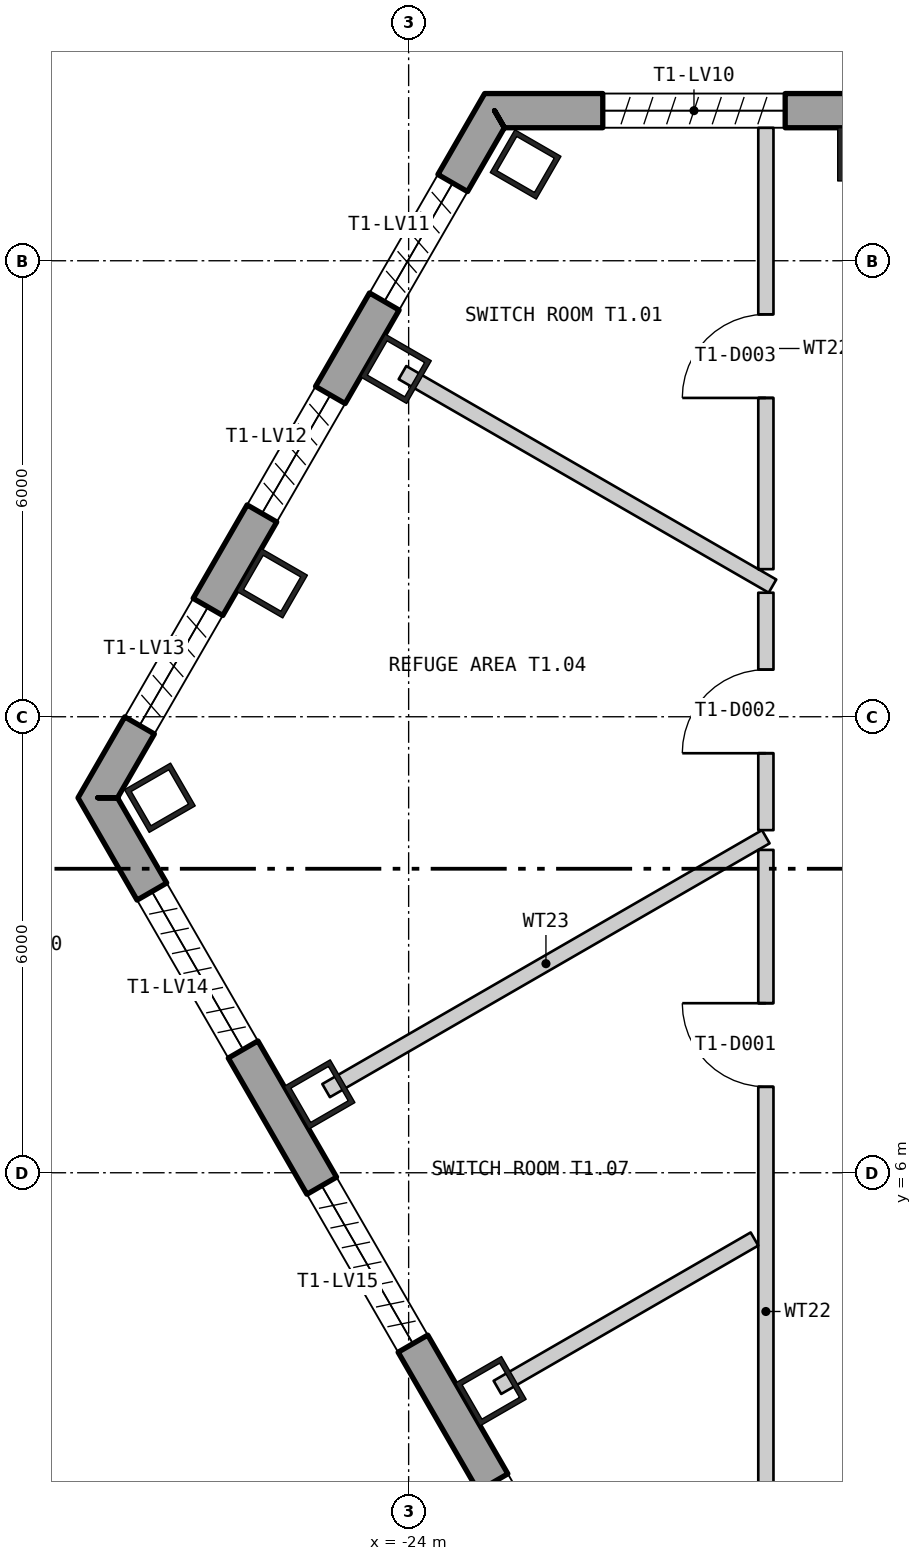
"""IFC4 building model, lengths in metres.
Left out: names, types, materials, properties, quantities, classifications, styles, units other than length and angle.
Written with IfcOpenShell. Run it as: python <this file> out.ifc"""

import sys

from ifc_helpers import new_model, si_unit, direction, frame, frame_2d, origin, origin_2d, place, context, subcontext, project, spatial, polyline, rectangle, hollow_rectangle, outline, extrude, element, fill, save


model = new_model("IFC4")
c1 = context("Model", 3, precision=1e-05, world=origin(), true_north=direction((0.0, 1.0)))
c2 = subcontext(c1, "Body", "Model", "MODEL_VIEW")
j1 = project(units=[si_unit("LENGTHUNIT", "METRE"), si_unit("PLANEANGLEUNIT", "RADIAN")], contexts=[c1])
p1 = place(None, origin())
s1 = spatial("IfcSite", under=j1, at=p1, CompositionType="ELEMENT")
p2 = place(p1, origin())
s2 = spatial("IfcBuilding", under=s1, at=p2, CompositionType="ELEMENT")
p3 = place(p2, frame((0.0, 0.0, 78.3)))
s3 = spatial("IfcBuildingStorey", under=s2, at=p3, CompositionType="ELEMENT", Elevation=78.3)
for number, where, z_axis, x_axis in (
    (1, (-18.03, 19.4, 0.0), (0.0, 0.0, 1.0), (-1.0, 0.0, 0.0)),
    (2, (-22.461, 19.267, 0.0), (0.0, 0.0, 1.0), (-0.5, -0.866, 0.0)),
    (3, (-24.167, 16.578, 0.0), (0.0, 0.0, 1.0), (-0.5, -0.866, 0.0)),
    (4, (-25.797, 13.756, 0.0), (0.0, 0.0, 1.0), (-0.5, -0.866, 0.0)),
    (5, (-27.273, 10.934, 0.0), (0.0, 0.0, 1.0), (0.5, -0.866, 0.0)),
    (6, (-25.172, 7.03, 0.0), (0.0, 0.0, 1.0), (0.5, -0.866, 0.0)),
    (7, (-22.919, 3.126, 0.0), (0.0, 0.0, 1.0), (0.5, -0.866, 0.0)),
):
    element("IfcColumn", number, at=place(p3, frame(where, z_axis=z_axis, x_axis=x_axis)), inside=s3, PredefinedType="COLUMN", context=c2, shape_type="SweptSolid", body=[
        extrude(hollow_rectangle(XDim=0.65, YDim=0.7, WallThickness=0.065, at=origin_2d()), origin(), (0.0, 0.0, 1.0), 6.0),
    ])
p4 = place(p3, frame((22.87, 19.975, -0.4), z_axis=(0.0, 0.0, 1.0), x_axis=(-1.0, 0.0, 0.0)))
e8 = element("IfcWall", 8, at=p4, inside=s3, PredefinedType="SOLIDWALL", context=c2, shape_type="SweptSolid", body=[
    extrude(outline(polyline([(-0.13, -0.225), (45.87, -0.225), (45.61, 0.225), (0.13, 0.225), (-0.13, -0.225)])), origin(), (0.0, 0.0, 1.0), 6.0),
])
p5 = place(p4, frame((1.424, 0.0, 1.6)))
e9 = element("IfcOpeningElement", 9, at=p5, cuts=e8, PredefinedType="OPENING", context=c2, shape_type="SweptSolid", body=[
    extrude(rectangle(XDim=2.4, YDim=3.6, at=frame_2d((1.2, 1.8))), frame((0.0, 0.235, 0.0), z_axis=(0.0, -1.0, 0.0), x_axis=(1.0, 0.0, 0.0)), (0.0, 0.0, 1.0), 0.47),
])
p6 = place(p4, frame((5.893, 0.0, 1.6)))
e10 = element("IfcOpeningElement", 10, at=p6, cuts=e8, PredefinedType="OPENING", context=c2, shape_type="SweptSolid", body=[
    extrude(rectangle(XDim=2.4, YDim=3.6, at=frame_2d((1.2, 1.8))), frame((0.0, 0.235, 0.0), z_axis=(0.0, -1.0, 0.0), x_axis=(1.0, 0.0, 0.0)), (0.0, 0.0, 1.0), 0.47),
])
p7 = place(p4, frame((10.401, 0.0, 1.6)))
e11 = element("IfcOpeningElement", 11, at=p7, cuts=e8, PredefinedType="OPENING", context=c2, shape_type="SweptSolid", body=[
    extrude(rectangle(XDim=2.4, YDim=3.6, at=frame_2d((1.2, 1.8))), frame((0.0, 0.235, 0.0), z_axis=(0.0, -1.0, 0.0), x_axis=(1.0, 0.0, 0.0)), (0.0, 0.0, 1.0), 0.47),
])
p8 = place(p4, frame((14.909, 0.0, 1.6)))
e12 = element("IfcOpeningElement", 12, at=p8, cuts=e8, PredefinedType="OPENING", context=c2, shape_type="SweptSolid", body=[
    extrude(rectangle(XDim=2.4, YDim=3.6, at=frame_2d((1.2, 1.8))), frame((0.0, 0.235, 0.0), z_axis=(0.0, -1.0, 0.0), x_axis=(1.0, 0.0, 0.0)), (0.0, 0.0, 1.0), 0.47),
])
p9 = place(p4, frame((19.416, 0.0, 1.6)))
e13 = element("IfcOpeningElement", 13, at=p9, cuts=e8, PredefinedType="OPENING", context=c2, shape_type="SweptSolid", body=[
    extrude(rectangle(XDim=2.4, YDim=3.6, at=frame_2d((1.2, 1.8))), frame((0.0, 0.235, 0.0), z_axis=(0.0, -1.0, 0.0), x_axis=(1.0, 0.0, 0.0)), (0.0, 0.0, 1.0), 0.47),
])
p10 = place(p4, frame((23.924, 0.0, 1.6)))
e14 = element("IfcOpeningElement", 14, at=p10, cuts=e8, PredefinedType="OPENING", context=c2, shape_type="SweptSolid", body=[
    extrude(rectangle(XDim=2.4, YDim=3.6, at=frame_2d((1.2, 1.8))), frame((0.0, 0.235, 0.0), z_axis=(0.0, -1.0, 0.0), x_axis=(1.0, 0.0, 0.0)), (0.0, 0.0, 1.0), 0.47),
])
p11 = place(p4, frame((28.431, 0.0, 1.6)))
e15 = element("IfcOpeningElement", 15, at=p11, cuts=e8, PredefinedType="OPENING", context=c2, shape_type="SweptSolid", body=[
    extrude(rectangle(XDim=2.4, YDim=3.6, at=frame_2d((1.2, 1.8))), frame((0.0, 0.235, 0.0), z_axis=(0.0, -1.0, 0.0), x_axis=(1.0, 0.0, 0.0)), (0.0, 0.0, 1.0), 0.47),
])
p12 = place(p4, frame((32.939, 0.0, 1.6)))
e16 = element("IfcOpeningElement", 16, at=p12, cuts=e8, PredefinedType="OPENING", context=c2, shape_type="SweptSolid", body=[
    extrude(rectangle(XDim=2.4, YDim=3.6, at=frame_2d((1.2, 1.8))), frame((0.0, 0.235, 0.0), z_axis=(0.0, -1.0, 0.0), x_axis=(1.0, 0.0, 0.0)), (0.0, 0.0, 1.0), 0.47),
])
p13 = place(p4, frame((37.447, 0.0, 1.6)))
e17 = element("IfcOpeningElement", 17, at=p13, cuts=e8, PredefinedType="OPENING", context=c2, shape_type="SweptSolid", body=[
    extrude(rectangle(XDim=2.4, YDim=3.6, at=frame_2d((1.2, 1.8))), frame((0.0, 0.235, 0.0), z_axis=(0.0, -1.0, 0.0), x_axis=(1.0, 0.0, 0.0)), (0.0, 0.0, 1.0), 0.47),
])
p14 = place(p4, frame((41.916, 0.0, 1.6)))
e18 = element("IfcOpeningElement", 18, at=p14, cuts=e8, PredefinedType="OPENING", context=c2, shape_type="SweptSolid", body=[
    extrude(rectangle(XDim=2.4, YDim=3.6, at=frame_2d((1.2, 1.8))), frame((0.0, 0.235, 0.0), z_axis=(0.0, -1.0, 0.0), x_axis=(1.0, 0.0, 0.0)), (0.0, 0.0, 1.0), 0.47),
])
p15 = place(p3, frame((-22.87, 19.975, -0.4), z_axis=(0.0, 0.0, 1.0), x_axis=(-0.499999104984, -0.866025920521, 0.0)))
e19 = element("IfcWall", 19, at=p15, inside=s3, PredefinedType="SOLIDWALL", context=c2, shape_type="SweptSolid", body=[
    extrude(outline(polyline([(-0.13, -0.225), (10.57, -0.225), (10.31, 0.225), (0.13, 0.225), (-0.13, -0.225)])), origin(), (0.0, 0.0, 1.0), 6.0),
])
p16 = place(p15, frame((1.1, 0.0, 1.6)))
e20 = element("IfcOpeningElement", 20, at=p16, cuts=e19, PredefinedType="OPENING", context=c2, shape_type="SweptSolid", body=[
    extrude(rectangle(XDim=1.8, YDim=3.6, at=frame_2d((0.9, 1.8))), frame((0.0, 0.235, 0.0), z_axis=(0.0, -1.0, 0.0), x_axis=(1.0, 0.0, 0.0)), (0.0, 0.0, 1.0), 0.47),
])
p17 = place(p15, frame((4.32, 0.0, 1.6)))
e21 = element("IfcOpeningElement", 21, at=p17, cuts=e19, PredefinedType="OPENING", context=c2, shape_type="SweptSolid", body=[
    extrude(rectangle(XDim=1.8, YDim=3.6, at=frame_2d((0.9, 1.8))), frame((0.0, 0.235, 0.0), z_axis=(0.0, -1.0, 0.0), x_axis=(1.0, 0.0, 0.0)), (0.0, 0.0, 1.0), 0.47),
])
p18 = place(p15, frame((7.54, 0.0, 1.6)))
e22 = element("IfcOpeningElement", 22, at=p18, cuts=e19, PredefinedType="OPENING", context=c2, shape_type="SweptSolid", body=[
    extrude(rectangle(XDim=1.8, YDim=3.6, at=frame_2d((0.9, 1.8))), frame((0.0, 0.235, 0.0), z_axis=(0.0, -1.0, 0.0), x_axis=(1.0, 0.0, 0.0)), (0.0, 0.0, 1.0), 0.47),
])
p19 = place(p3, frame((-28.09, 10.934, -0.18), z_axis=(0.0, 0.0, 1.0), x_axis=(0.500000711659, -0.866024992908, 0.0)))
e23 = element("IfcWall", 23, at=p19, inside=s3, PredefinedType="SOLIDWALL", context=c2, shape_type="SweptSolid", body=[
    extrude(outline(polyline([(-0.13, -0.225), (45.87, -0.225), (45.61, 0.225), (0.13, 0.225), (-0.13, -0.225)])), origin(), (0.0, 0.0, 1.0), 6.0),
])
p20 = place(p19, frame((1.424, 0.0, 1.38)))
e24 = element("IfcOpeningElement", 24, at=p20, cuts=e23, PredefinedType="OPENING", context=c2, shape_type="SweptSolid", body=[
    extrude(rectangle(XDim=2.4, YDim=3.6, at=frame_2d((1.2, 1.8))), frame((0.0, 0.235, 0.0), z_axis=(0.0, -1.0, 0.0), x_axis=(1.0, 0.0, 0.0)), (0.0, 0.0, 1.0), 0.47),
])
p21 = place(p19, frame((5.893, 0.0, 1.38)))
e25 = element("IfcOpeningElement", 25, at=p21, cuts=e23, PredefinedType="OPENING", context=c2, shape_type="SweptSolid", body=[
    extrude(rectangle(XDim=2.4, YDim=3.6, at=frame_2d((1.2, 1.8))), frame((0.0, 0.235, 0.0), z_axis=(0.0, -1.0, 0.0), x_axis=(1.0, 0.0, 0.0)), (0.0, 0.0, 1.0), 0.47),
])
p22 = place(p19, frame((10.401, 0.0, 1.38)))
e26 = element("IfcOpeningElement", 26, at=p22, cuts=e23, PredefinedType="OPENING", context=c2, shape_type="SweptSolid", body=[
    extrude(rectangle(XDim=2.4, YDim=3.6, at=frame_2d((1.2, 1.8))), frame((0.0, 0.235, 0.0), z_axis=(0.0, -1.0, 0.0), x_axis=(1.0, 0.0, 0.0)), (0.0, 0.0, 1.0), 0.47),
])
p23 = place(p19, frame((14.909, 0.0, 1.38)))
e27 = element("IfcOpeningElement", 27, at=p23, cuts=e23, PredefinedType="OPENING", context=c2, shape_type="SweptSolid", body=[
    extrude(rectangle(XDim=2.4, YDim=3.6, at=frame_2d((1.2, 1.8))), frame((0.0, 0.235, 0.0), z_axis=(0.0, -1.0, 0.0), x_axis=(1.0, 0.0, 0.0)), (0.0, 0.0, 1.0), 0.47),
])
p24 = place(p19, frame((19.416, 0.0, 1.38)))
e28 = element("IfcOpeningElement", 28, at=p24, cuts=e23, PredefinedType="OPENING", context=c2, shape_type="SweptSolid", body=[
    extrude(rectangle(XDim=2.4, YDim=3.6, at=frame_2d((1.2, 1.8))), frame((0.0, 0.235, 0.0), z_axis=(0.0, -1.0, 0.0), x_axis=(1.0, 0.0, 0.0)), (0.0, 0.0, 1.0), 0.47),
])
p25 = place(p19, frame((23.924, 0.0, 1.38)))
e29 = element("IfcOpeningElement", 29, at=p25, cuts=e23, PredefinedType="OPENING", context=c2, shape_type="SweptSolid", body=[
    extrude(rectangle(XDim=2.4, YDim=3.6, at=frame_2d((1.2, 1.8))), frame((0.0, 0.235, 0.0), z_axis=(0.0, -1.0, 0.0), x_axis=(1.0, 0.0, 0.0)), (0.0, 0.0, 1.0), 0.47),
])
p26 = place(p19, frame((28.431, 0.0, 1.38)))
e30 = element("IfcOpeningElement", 30, at=p26, cuts=e23, PredefinedType="OPENING", context=c2, shape_type="SweptSolid", body=[
    extrude(rectangle(XDim=2.4, YDim=3.6, at=frame_2d((1.2, 1.8))), frame((0.0, 0.235, 0.0), z_axis=(0.0, -1.0, 0.0), x_axis=(1.0, 0.0, 0.0)), (0.0, 0.0, 1.0), 0.47),
])
p27 = place(p19, frame((32.939, 0.0, 1.38)))
e31 = element("IfcOpeningElement", 31, at=p27, cuts=e23, PredefinedType="OPENING", context=c2, shape_type="SweptSolid", body=[
    extrude(rectangle(XDim=2.4, YDim=3.6, at=frame_2d((1.2, 1.8))), frame((0.0, 0.235, 0.0), z_axis=(0.0, -1.0, 0.0), x_axis=(1.0, 0.0, 0.0)), (0.0, 0.0, 1.0), 0.47),
])
p28 = place(p19, frame((37.447, 0.0, 1.38)))
e32 = element("IfcOpeningElement", 32, at=p28, cuts=e23, PredefinedType="OPENING", context=c2, shape_type="SweptSolid", body=[
    extrude(rectangle(XDim=2.4, YDim=3.6, at=frame_2d((1.2, 1.8))), frame((0.0, 0.235, 0.0), z_axis=(0.0, -1.0, 0.0), x_axis=(1.0, 0.0, 0.0)), (0.0, 0.0, 1.0), 0.47),
])
p29 = place(p19, frame((41.916, 0.0, 1.38)))
e33 = element("IfcOpeningElement", 33, at=p29, cuts=e23, PredefinedType="OPENING", context=c2, shape_type="SweptSolid", body=[
    extrude(rectangle(XDim=2.4, YDim=3.6, at=frame_2d((1.2, 1.8))), frame((0.0, 0.235, 0.0), z_axis=(0.0, -1.0, 0.0), x_axis=(1.0, 0.0, 0.0)), (0.0, 0.0, 1.0), 0.47),
])
p30 = place(p3, frame((-25.086, 7.081, 0.0), z_axis=(0.0, 0.0, 1.0), x_axis=(0.866023543838, 0.500003221507, 0.0)))
e34 = element("IfcWall", 34, at=p30, inside=s3, PredefinedType="PARTITIONING", context=c2, shape_type="SweptSolid", body=[
    extrude(rectangle(XDim=6.68, YDim=0.2, at=frame_2d((3.34, 0.0))), origin(), (0.0, 0.0, 1.0), 5.8),
])
p31 = place(p3, frame((-24.081, 16.528, 0.0), z_axis=(0.0, 0.0, 1.0), x_axis=(0.866144113061, -0.499794333112, 0.0)))
e35 = element("IfcWall", 35, at=p31, inside=s3, PredefinedType="PARTITIONING", context=c2, shape_type="SweptSolid", body=[
    extrude(rectangle(XDim=5.62, YDim=0.2, at=frame_2d((2.81, 0.0))), origin(), (0.0, 0.0, 1.0), 5.8),
])
p32 = place(p3, frame((-22.832, 3.176, 0.0), z_axis=(0.0, 0.0, 1.0), x_axis=(0.86609177584, 0.499885022602, 0.0)))
e36 = element("IfcWall", 36, at=p32, inside=s3, PredefinedType="PARTITIONING", context=c2, shape_type="SweptSolid", body=[
    extrude(rectangle(XDim=3.905, YDim=0.2, at=frame_2d((1.952, 0.0))), origin(), (0.0, 0.0, 1.0), 5.8),
])
p33 = place(p3, frame((-19.3, -1.899, 0.0), z_axis=(0.0, 0.0, 1.0), x_axis=(0.0, 1.0, 0.0)))
e37 = element("IfcWall", 37, at=p33, inside=s3, PredefinedType="PARTITIONING", context=c2, shape_type="SweptSolid", body=[
    extrude(rectangle(XDim=12.147, YDim=0.2, at=frame_2d((6.074, 0.0))), origin(), (0.0, 0.0, 1.0), 5.8),
])
p34 = place(p33, frame((9.03, 0.0, 0.0)))
e38 = element("IfcOpeningElement", 38, at=p34, cuts=e37, PredefinedType="OPENING", context=c2, shape_type="SweptSolid", body=[
    extrude(rectangle(XDim=1.1, YDim=2.1, at=frame_2d((0.55, 1.05))), frame((0.0, 0.11, 0.0), z_axis=(0.0, -1.0, 0.0), x_axis=(1.0, 0.0, 0.0)), (0.0, 0.0, 1.0), 0.22),
])
p35 = place(p3, frame((-19.3, 10.508, 0.0), z_axis=(0.0, 0.0, 1.0), x_axis=(0.0, 1.0, 0.0)))
e39 = element("IfcWall", 39, at=p35, inside=s3, PredefinedType="PARTITIONING", context=c2, shape_type="SweptSolid", body=[
    extrude(rectangle(XDim=3.124, YDim=0.2, at=frame_2d((1.562, 0.0))), origin(), (0.0, 0.0, 1.0), 5.8),
])
p36 = place(p35, frame((1.012, 0.0, 0.0)))
e40 = element("IfcOpeningElement", 40, at=p36, cuts=e39, PredefinedType="OPENING", context=c2, shape_type="SweptSolid", body=[
    extrude(rectangle(XDim=1.1, YDim=2.1, at=frame_2d((0.55, 1.05))), frame((0.0, 0.11, 0.0), z_axis=(0.0, -1.0, 0.0), x_axis=(1.0, 0.0, 0.0)), (0.0, 0.0, 1.0), 0.22),
])
p37 = place(p3, frame((-19.3, 13.942, 0.0), z_axis=(0.0, 0.0, 1.0), x_axis=(0.0, 1.0, 0.0)))
e41 = element("IfcWall", 41, at=p37, inside=s3, PredefinedType="PARTITIONING", context=c2, shape_type="SweptSolid", body=[
    extrude(rectangle(XDim=5.807, YDim=0.2, at=frame_2d((2.904, 0.0))), origin(), (0.0, 0.0, 1.0), 5.8),
])
p38 = place(p37, frame((2.253, 0.0, 0.0)))
e42 = element("IfcOpeningElement", 42, at=p38, cuts=e41, PredefinedType="OPENING", context=c2, shape_type="SweptSolid", body=[
    extrude(rectangle(XDim=1.1, YDim=2.1, at=frame_2d((0.55, 1.05))), frame((0.0, 0.11, 0.0), z_axis=(0.0, -1.0, 0.0), x_axis=(1.0, 0.0, 0.0)), (0.0, 0.0, 1.0), 0.22),
])
p39 = place(p34, origin())
e43 = element("IfcDoor", 43, at=p39, inside=s3, OperationType="SINGLE_SWING_LEFT", PredefinedType="DOOR", context=c2, shape_type="SweptSolid", body=[
    extrude(rectangle(XDim=1.1, YDim=2.1, at=frame_2d((0.55, 1.05))), frame((0.0, 0.025, 0.0), z_axis=(0.0, -1.0, 0.0), x_axis=(1.0, 0.0, 0.0)), (0.0, 0.0, 1.0), 0.05),
])
fill(e38, e43)
p40 = place(p36, origin())
e44 = element("IfcDoor", 44, at=p40, inside=s3, OperationType="SINGLE_SWING_RIGHT", PredefinedType="DOOR", context=c2, shape_type="SweptSolid", body=[
    extrude(rectangle(XDim=1.1, YDim=2.1, at=frame_2d((0.55, 1.05))), frame((0.0, 0.025, 0.0), z_axis=(0.0, -1.0, 0.0), x_axis=(1.0, 0.0, 0.0)), (0.0, 0.0, 1.0), 0.05),
])
fill(e40, e44)
p41 = place(p38, origin())
e45 = element("IfcDoor", 45, at=p41, inside=s3, OperationType="SINGLE_SWING_RIGHT", PredefinedType="DOOR", context=c2, shape_type="SweptSolid", body=[
    extrude(rectangle(XDim=1.1, YDim=2.1, at=frame_2d((0.55, 1.05))), frame((0.0, 0.025, 0.0), z_axis=(0.0, -1.0, 0.0), x_axis=(1.0, 0.0, 0.0)), (0.0, 0.0, 1.0), 0.05),
])
fill(e42, e45)
save(model, sys.argv[1])
